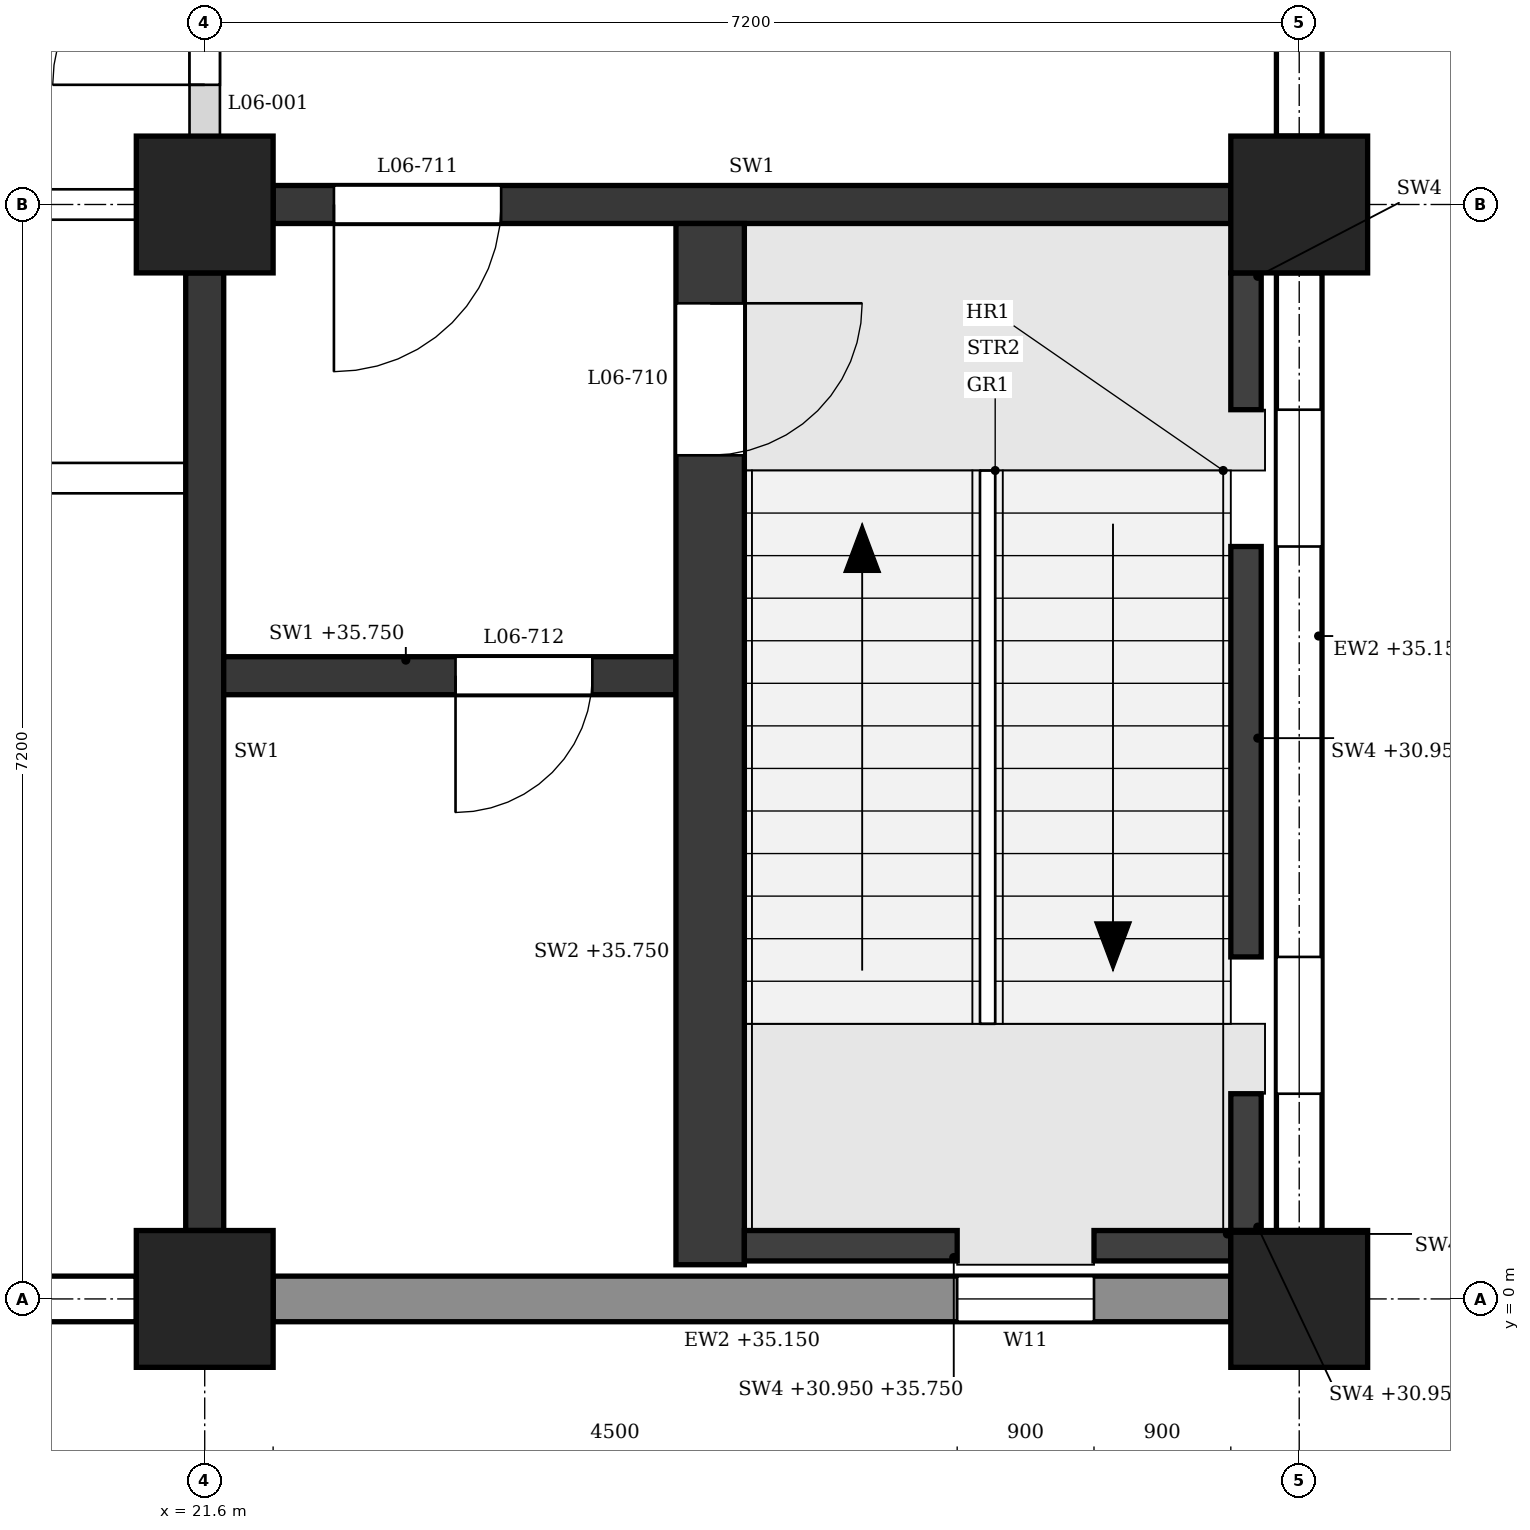
"""IFC4 building model, lengths in metres.
Left out: names, types, materials, properties, quantities, classifications, styles, units other than length and angle.
Written with IfcOpenShell. Run it as: python <this file> out.ifc"""

import sys

from ifc_helpers import new_model, si_unit, direction, frame, frame_2d, origin, origin_2d, place, context, subcontext, project, spatial, polyline, rectangle, outline, extrude, element, fill, save


model = new_model("IFC4")
c1 = context("Model", 3, precision=1e-05, world=origin(), true_north=direction((0.0, 1.0)))
c2 = subcontext(c1, "Body", "Model", "MODEL_VIEW")
j1 = project(units=[si_unit("LENGTHUNIT", "METRE"), si_unit("PLANEANGLEUNIT", "RADIAN")], contexts=[c1])
p1 = place(None, origin())
s1 = spatial("IfcSite", under=j1, at=p1, CompositionType="ELEMENT")
p2 = place(p1, origin())
s2 = spatial("IfcBuilding", under=s1, at=p2, CompositionType="ELEMENT")
p3 = place(p2, frame((0.0, 0.0, 31.2)))
s3 = spatial("IfcBuildingStorey", under=s2, at=p3, CompositionType="ELEMENT", Elevation=31.2)
for number, where, z_axis, x_axis in (
    (1, (21.6, 0.0, 0.0), (0.0, 0.0, 1.0), (1.0, 0.0, 0.0)),
    (2, (21.6, 7.2, 0.0), (0.0, 0.0, 1.0), (1.0, 0.0, 0.0)),
    (3, (28.8, 0.0, 0.0), (0.0, 0.0, 1.0), (1.0, 0.0, 0.0)),
    (4, (28.8, 7.2, 0.0), (0.0, 0.0, 1.0), (1.0, 0.0, 0.0)),
):
    element("IfcColumn", number, at=place(p3, frame(where, z_axis=z_axis, x_axis=x_axis)), inside=s3, PredefinedType="COLUMN", context=c2, shape_type="SweptSolid", body=[
        extrude(rectangle(XDim=0.9, YDim=0.9, at=origin_2d()), origin(), (0.0, 0.0, 1.0), 4.8),
    ])
p4 = place(p3, frame((14.85, 0.0, 0.0), z_axis=(0.0, 0.0, 1.0), x_axis=(1.0, 0.0, 0.0)))
e5 = element("IfcWall", 5, at=p4, inside=s3, PredefinedType="STANDARD", context=c2, shape_type="SweptSolid", body=[
    extrude(rectangle(XDim=6.3, YDim=0.3, at=frame_2d((3.15, 0.0))), origin(), (0.0, 0.0, 1.0), 3.95),
])
p5 = place(p4, frame((0.6, 0.0, 0.9)))
e6 = element("IfcOpeningElement", 6, at=p5, cuts=e5, PredefinedType="OPENING", context=c2, shape_type="SweptSolid", body=[
    extrude(outline(polyline([(0.0, 0.0), (1.5, 0.0), (1.5, 1.75), (0.75, 2.5), (0.0, 1.75), (0.0, 0.0)])), frame((0.0, 0.16, 0.0), z_axis=(0.0, -1.0, 0.0), x_axis=(1.0, 0.0, 0.0)), (0.0, 0.0, 1.0), 0.32),
])
p6 = place(p4, frame((4.2, 0.0, 0.9)))
e7 = element("IfcOpeningElement", 7, at=p6, cuts=e5, PredefinedType="OPENING", context=c2, shape_type="SweptSolid", body=[
    extrude(outline(polyline([(0.0, 0.0), (1.5, 0.0), (1.5, 1.75), (0.75, 2.5), (0.0, 1.75), (0.0, 0.0)])), frame((0.0, 0.16, 0.0), z_axis=(0.0, -1.0, 0.0), x_axis=(1.0, 0.0, 0.0)), (0.0, 0.0, 1.0), 0.32),
])
p7 = place(p3, frame((22.05, 0.0, 0.0), z_axis=(0.0, 0.0, 1.0), x_axis=(1.0, 0.0, 0.0)))
e8 = element("IfcWall", 8, at=p7, inside=s3, PredefinedType="STANDARD", context=c2, shape_type="SweptSolid", body=[
    extrude(rectangle(XDim=6.3, YDim=0.3, at=frame_2d((3.15, 0.0))), origin(), (0.0, 0.0, 1.0), 3.95),
])
p8 = place(p7, frame((4.5, 0.0, 0.9)))
e9 = element("IfcOpeningElement", 9, at=p8, cuts=e8, PredefinedType="OPENING", context=c2, shape_type="SweptSolid", body=[
    extrude(outline(polyline([(0.0, 0.0), (0.9, 0.0), (0.9, 2.05), (0.45, 2.5), (0.0, 2.05), (0.0, 0.0)])), frame((0.0, 0.16, 0.0), z_axis=(0.0, -1.0, 0.0), x_axis=(1.0, 0.0, 0.0)), (0.0, 0.0, 1.0), 0.32),
])
p9 = place(p3, frame((28.8, 0.45, 0.0), z_axis=(0.0, 0.0, 1.0), x_axis=(0.0, 1.0, 0.0)))
e10 = element("IfcWall", 10, at=p9, inside=s3, PredefinedType="STANDARD", context=c2, shape_type="SweptSolid", body=[
    extrude(rectangle(XDim=6.3, YDim=0.3, at=frame_2d((3.15, 0.0))), origin(), (0.0, 0.0, 1.0), 3.95),
])
p10 = place(p9, frame((0.9, 0.0, 0.9)))
e11 = element("IfcOpeningElement", 11, at=p10, cuts=e10, PredefinedType="OPENING", context=c2, shape_type="SweptSolid", body=[
    extrude(outline(polyline([(0.0, 0.0), (0.9, 0.0), (0.9, 2.05), (0.45, 2.5), (0.0, 2.05), (0.0, 0.0)])), frame((0.0, 0.16, 0.0), z_axis=(0.0, -1.0, 0.0), x_axis=(1.0, 0.0, 0.0)), (0.0, 0.0, 1.0), 0.32),
])
p11 = place(p9, frame((4.5, 0.0, 0.9)))
e12 = element("IfcOpeningElement", 12, at=p11, cuts=e10, PredefinedType="OPENING", context=c2, shape_type="SweptSolid", body=[
    extrude(outline(polyline([(0.0, 0.0), (0.9, 0.0), (0.9, 2.05), (0.45, 2.5), (0.0, 2.05), (0.0, 0.0)])), frame((0.0, 0.16, 0.0), z_axis=(0.0, -1.0, 0.0), x_axis=(1.0, 0.0, 0.0)), (0.0, 0.0, 1.0), 0.32),
])
p12 = place(p3, frame((28.8, 7.65, 0.0), z_axis=(0.0, 0.0, 1.0), x_axis=(0.0, 1.0, 0.0)))
e13 = element("IfcWall", 13, at=p12, inside=s3, PredefinedType="STANDARD", context=c2, shape_type="SweptSolid", body=[
    extrude(rectangle(XDim=6.3, YDim=0.3, at=frame_2d((3.15, 0.0))), origin(), (0.0, 0.0, 1.0), 3.95),
])
p13 = place(p12, frame((0.6, 0.0, 0.9)))
e14 = element("IfcOpeningElement", 14, at=p13, cuts=e13, PredefinedType="OPENING", context=c2, shape_type="SweptSolid", body=[
    extrude(outline(polyline([(0.0, 0.0), (1.5, 0.0), (1.5, 1.75), (0.75, 2.5), (0.0, 1.75), (0.0, 0.0)])), frame((0.0, 0.16, 0.0), z_axis=(0.0, -1.0, 0.0), x_axis=(1.0, 0.0, 0.0)), (0.0, 0.0, 1.0), 0.32),
])
p14 = place(p3, frame((22.05, 7.2, 0.0), z_axis=(0.0, 0.0, 1.0), x_axis=(1.0, 0.0, 0.0)))
e15 = element("IfcWall", 15, at=p14, inside=s3, PredefinedType="SHEAR", context=c2, shape_type="SweptSolid", body=[
    extrude(rectangle(XDim=6.3, YDim=0.25, at=frame_2d((3.15, 0.0))), origin(), (0.0, 0.0, 1.0), 3.8),
])
p15 = place(p14, frame((0.4, 0.0, 0.0)))
e16 = element("IfcOpeningElement", 16, at=p15, cuts=e15, PredefinedType="OPENING", context=c2, shape_type="SweptSolid", body=[
    extrude(rectangle(XDim=1.1, YDim=2.1, at=frame_2d((0.55, 1.05))), frame((0.0, 0.135, 0.0), z_axis=(0.0, -1.0, 0.0), x_axis=(1.0, 0.0, 0.0)), (0.0, 0.0, 1.0), 0.27),
])
p16 = place(p3, frame((21.6, 0.45, 0.0), z_axis=(0.0, 0.0, 1.0), x_axis=(0.0, 1.0, 0.0)))
e17 = element("IfcWall", 17, at=p16, inside=s3, PredefinedType="SHEAR", context=c2, shape_type="SweptSolid", body=[
    extrude(rectangle(XDim=6.3, YDim=0.25, at=frame_2d((3.15, 0.0))), origin(), (0.0, 0.0, 1.0), 3.8),
])
p17 = place(p3, frame((28.45, 0.45, -0.25), z_axis=(0.0, 0.0, 1.0), x_axis=(0.0, 1.0, 0.0)))
e18 = element("IfcWall", 18, at=p17, inside=s3, PredefinedType="SHEAR", context=c2, shape_type="SweptSolid", body=[
    extrude(rectangle(XDim=0.9, YDim=0.2, at=frame_2d((0.45, 0.0))), origin(), (0.0, 0.0, 1.0), 4.8),
])
p18 = place(p3, frame((28.45, 2.25, -0.25), z_axis=(0.0, 0.0, 1.0), x_axis=(0.0, 1.0, 0.0)))
e19 = element("IfcWall", 19, at=p18, inside=s3, PredefinedType="SHEAR", context=c2, shape_type="SweptSolid", body=[
    extrude(rectangle(XDim=2.7, YDim=0.2, at=frame_2d((1.35, 0.0))), origin(), (0.0, 0.0, 1.0), 4.8),
])
p19 = place(p3, frame((28.45, 5.85, -0.25), z_axis=(0.0, 0.0, 1.0), x_axis=(0.0, 1.0, 0.0)))
e20 = element("IfcWall", 20, at=p19, inside=s3, PredefinedType="SHEAR", context=c2, shape_type="SweptSolid", body=[
    extrude(rectangle(XDim=0.9, YDim=0.2, at=frame_2d((0.45, 0.0))), origin(), (0.0, 0.0, 1.0), 4.8),
])
p20 = place(p3, frame((25.15, 0.35, -0.25), z_axis=(0.0, 0.0, 1.0), x_axis=(1.0, 0.0, 0.0)))
e21 = element("IfcWall", 21, at=p20, inside=s3, PredefinedType="SHEAR", context=c2, shape_type="SweptSolid", body=[
    extrude(rectangle(XDim=1.4, YDim=0.2, at=frame_2d((0.7, 0.0))), origin(), (0.0, 0.0, 1.0), 4.8),
])
p21 = place(p3, frame((27.45, 0.35, -0.25), z_axis=(0.0, 0.0, 1.0), x_axis=(1.0, 0.0, 0.0)))
e22 = element("IfcWall", 22, at=p21, inside=s3, PredefinedType="SHEAR", context=c2, shape_type="SweptSolid", body=[
    extrude(rectangle(XDim=0.9, YDim=0.2, at=frame_2d((0.45, 0.0))), origin(), (0.0, 0.0, 1.0), 4.8),
])
p22 = place(p3, frame((24.925, 0.225, 0.0), z_axis=(0.0, 0.0, 1.0), x_axis=(0.0, 1.0, 0.0)))
e23 = element("IfcWall", 23, at=p22, inside=s3, PredefinedType="SHEAR", context=c2, shape_type="SweptSolid", body=[
    extrude(rectangle(XDim=6.85, YDim=0.45, at=frame_2d((3.425, 0.0))), origin(), (0.0, 0.0, 1.0), 4.55),
])
p23 = place(p22, frame((5.325, 0.0, 0.0)))
e24 = element("IfcOpeningElement", 24, at=p23, cuts=e23, PredefinedType="OPENING", context=c2, shape_type="SweptSolid", body=[
    extrude(rectangle(XDim=1.0, YDim=2.1, at=frame_2d((0.5, 1.05))), frame((0.0, 0.235, 0.0), z_axis=(0.0, -1.0, 0.0), x_axis=(1.0, 0.0, 0.0)), (0.0, 0.0, 1.0), 0.47),
])
p24 = place(p3, frame((21.725, 4.1, 0.0), z_axis=(0.0, 0.0, 1.0), x_axis=(1.0, 0.0, 0.0)))
e25 = element("IfcWall", 25, at=p24, inside=s3, PredefinedType="SHEAR", context=c2, shape_type="SweptSolid", body=[
    extrude(rectangle(XDim=2.975, YDim=0.25, at=frame_2d((1.487, 0.0))), origin(), (0.0, 0.0, 1.0), 4.55),
])
p25 = place(p24, frame((1.525, 0.0, 0.0)))
e26 = element("IfcOpeningElement", 26, at=p25, cuts=e25, PredefinedType="OPENING", context=c2, shape_type="SweptSolid", body=[
    extrude(rectangle(XDim=0.9, YDim=2.1, at=frame_2d((0.45, 1.05))), frame((0.0, 0.135, 0.0), z_axis=(0.0, -1.0, 0.0), x_axis=(1.0, 0.0, 0.0)), (0.0, 0.0, 1.0), 0.27),
])
p26 = place(p3, frame((7.325, 5.4, 0.0), z_axis=(0.0, 0.0, 1.0), x_axis=(1.0, 0.0, 0.0)))
e27 = element("IfcWall", 27, at=p26, inside=s3, PredefinedType="PARTITIONING", context=c2, shape_type="SweptSolid", body=[
    extrude(outline(polyline([(0.0, 0.0), (14.15, 0.0), (14.15, 3.8), (14.025, 3.8), (14.025, 4.55), (7.325, 4.55), (7.325, 3.8), (6.825, 3.8), (6.825, 4.55), (0.125, 4.55), (0.125, 3.8), (0.0, 3.8), (0.0, 0.0)])), frame((0.0, 0.1, 0.0), z_axis=(0.0, -1.0, 0.0), x_axis=(1.0, 0.0, 0.0)), (0.0, 0.0, 1.0), 0.2),
])
p27 = place(p26, frame((1.238, 0.0, 0.0)))
e28 = element("IfcOpeningElement", 28, at=p27, cuts=e27, PredefinedType="OPENING", context=c2, shape_type="SweptSolid", body=[
    extrude(rectangle(XDim=1.0, YDim=2.1, at=frame_2d((0.5, 1.05))), frame((0.0, 0.11, 0.0), z_axis=(0.0, -1.0, 0.0), x_axis=(1.0, 0.0, 0.0)), (0.0, 0.0, 1.0), 0.22),
])
p28 = place(p26, frame((4.775, 0.0, 0.0)))
e29 = element("IfcOpeningElement", 29, at=p28, cuts=e27, PredefinedType="OPENING", context=c2, shape_type="SweptSolid", body=[
    extrude(rectangle(XDim=1.0, YDim=2.1, at=frame_2d((0.5, 1.05))), frame((0.0, 0.11, 0.0), z_axis=(0.0, -1.0, 0.0), x_axis=(1.0, 0.0, 0.0)), (0.0, 0.0, 1.0), 0.22),
])
p29 = place(p26, frame((8.375, 0.0, 0.0)))
e30 = element("IfcOpeningElement", 30, at=p29, cuts=e27, PredefinedType="OPENING", context=c2, shape_type="SweptSolid", body=[
    extrude(rectangle(XDim=1.0, YDim=2.1, at=frame_2d((0.5, 1.05))), frame((0.0, 0.11, 0.0), z_axis=(0.0, -1.0, 0.0), x_axis=(1.0, 0.0, 0.0)), (0.0, 0.0, 1.0), 0.22),
])
p30 = place(p26, frame((11.913, 0.0, 0.0)))
e31 = element("IfcOpeningElement", 31, at=p30, cuts=e27, PredefinedType="OPENING", context=c2, shape_type="SweptSolid", body=[
    extrude(rectangle(XDim=1.0, YDim=2.1, at=frame_2d((0.5, 1.05))), frame((0.0, 0.11, 0.0), z_axis=(0.0, -1.0, 0.0), x_axis=(1.0, 0.0, 0.0)), (0.0, 0.0, 1.0), 0.22),
])
p31 = place(p3, frame((14.85, 7.2, 0.0), z_axis=(0.0, 0.0, 1.0), x_axis=(1.0, 0.0, 0.0)))
e32 = element("IfcWall", 32, at=p31, inside=s3, PredefinedType="PARTITIONING", context=c2, shape_type="SweptSolid", body=[
    extrude(rectangle(XDim=6.3, YDim=0.2, at=frame_2d((3.15, 0.0))), origin(), (0.0, 0.0, 1.0), 3.8),
])
p32 = place(p31, frame((4.225, 0.0, 0.0)))
e33 = element("IfcOpeningElement", 33, at=p32, cuts=e32, PredefinedType="OPENING", context=c2, shape_type="SweptSolid", body=[
    extrude(rectangle(XDim=1.0, YDim=2.1, at=frame_2d((0.5, 1.05))), frame((0.0, 0.11, 0.0), z_axis=(0.0, -1.0, 0.0), x_axis=(1.0, 0.0, 0.0)), (0.0, 0.0, 1.0), 0.22),
])
p33 = place(p3, frame((21.6, 7.65, 0.0), z_axis=(0.0, 0.0, 1.0), x_axis=(0.0, 1.0, 0.0)))
e34 = element("IfcWall", 34, at=p33, inside=s3, PredefinedType="PARTITIONING", context=c2, shape_type="SweptSolid", body=[
    extrude(rectangle(XDim=2.675, YDim=0.2, at=frame_2d((1.337, 0.0))), origin(), (0.0, 0.0, 1.0), 3.8),
])
p34 = place(p33, frame((0.337, 0.0, 0.0)))
e35 = element("IfcOpeningElement", 35, at=p34, cuts=e34, PredefinedType="OPENING", context=c2, shape_type="SweptSolid", body=[
    extrude(rectangle(XDim=2.0, YDim=2.4, at=frame_2d((1.0, 1.2))), frame((0.0, 0.11, 0.0), z_axis=(0.0, -1.0, 0.0), x_axis=(1.0, 0.0, 0.0)), (0.0, 0.0, 1.0), 0.22),
])
p35 = place(p10, origin())
e36 = element("IfcWindow", 36, at=p35, inside=s3, PartitioningType="SINGLE_PANEL", PredefinedType="WINDOW", context=c2, shape_type="SweptSolid", body=[
    extrude(outline(polyline([(0.0, 0.0), (0.9, 0.0), (0.9, 2.05), (0.45, 2.5), (0.0, 2.05), (0.0, 0.0)])), frame((0.0, 0.03, 0.0), z_axis=(0.0, -1.0, 0.0), x_axis=(1.0, 0.0, 0.0)), (0.0, 0.0, 1.0), 0.06),
])
fill(e11, e36)
p36 = place(p11, origin())
e37 = element("IfcWindow", 37, at=p36, inside=s3, PartitioningType="SINGLE_PANEL", PredefinedType="WINDOW", context=c2, shape_type="SweptSolid", body=[
    extrude(outline(polyline([(0.0, 0.0), (0.9, 0.0), (0.9, 2.05), (0.45, 2.5), (0.0, 2.05), (0.0, 0.0)])), frame((0.0, 0.03, 0.0), z_axis=(0.0, -1.0, 0.0), x_axis=(1.0, 0.0, 0.0)), (0.0, 0.0, 1.0), 0.06),
])
fill(e12, e37)
p37 = place(p8, origin())
e38 = element("IfcWindow", 38, at=p37, inside=s3, PartitioningType="SINGLE_PANEL", PredefinedType="WINDOW", context=c2, shape_type="SweptSolid", body=[
    extrude(outline(polyline([(0.0, 0.0), (0.9, 0.0), (0.9, 2.05), (0.45, 2.5), (0.0, 2.05), (0.0, 0.0)])), frame((0.0, 0.03, 0.0), z_axis=(0.0, -1.0, 0.0), x_axis=(1.0, 0.0, 0.0)), (0.0, 0.0, 1.0), 0.06),
])
fill(e9, e38)
p38 = place(p23, frame((1.0, 0.0, 0.0), z_axis=(0.0, 0.0, 1.0), x_axis=(-1.0, 0.0, 0.0)))
e39 = element("IfcDoor", 39, at=p38, inside=s3, OperationType="SINGLE_SWING_LEFT", PredefinedType="DOOR", context=c2, shape_type="SweptSolid", body=[
    extrude(rectangle(XDim=1.0, YDim=2.1, at=frame_2d((0.5, 1.05))), frame((0.0, 0.025, 0.0), z_axis=(0.0, -1.0, 0.0), x_axis=(1.0, 0.0, 0.0)), (0.0, 0.0, 1.0), 0.05),
])
fill(e24, e39)
p39 = place(p15, frame((1.1, 0.0, 0.0), z_axis=(0.0, 0.0, 1.0), x_axis=(-1.0, 0.0, 0.0)))
e40 = element("IfcDoor", 40, at=p39, inside=s3, OperationType="SINGLE_SWING_RIGHT", PredefinedType="DOOR", context=c2, shape_type="SweptSolid", body=[
    extrude(rectangle(XDim=1.1, YDim=2.1, at=frame_2d((0.55, 1.05))), frame((0.0, 0.025, 0.0), z_axis=(0.0, -1.0, 0.0), x_axis=(1.0, 0.0, 0.0)), (0.0, 0.0, 1.0), 0.05),
])
fill(e16, e40)
p40 = place(p25, frame((0.9, 0.0, 0.0), z_axis=(0.0, 0.0, 1.0), x_axis=(-1.0, 0.0, 0.0)))
e41 = element("IfcDoor", 41, at=p40, inside=s3, OperationType="SINGLE_SWING_RIGHT", PredefinedType="DOOR", context=c2, shape_type="SweptSolid", body=[
    extrude(rectangle(XDim=0.9, YDim=2.1, at=frame_2d((0.45, 1.05))), frame((0.0, 0.025, 0.0), z_axis=(0.0, -1.0, 0.0), x_axis=(1.0, 0.0, 0.0)), (0.0, 0.0, 1.0), 0.05),
])
fill(e26, e41)
p41 = place(p34, origin())
e42 = element("IfcDoor", 42, at=p41, inside=s3, OperationType="DOUBLE_DOOR_SINGLE_SWING", PredefinedType="DOOR", context=c2, shape_type="SweptSolid", body=[
    extrude(rectangle(XDim=2.0, YDim=2.4, at=frame_2d((1.0, 1.2))), frame((0.0, 0.025, 0.0), z_axis=(0.0, -1.0, 0.0), x_axis=(1.0, 0.0, 0.0)), (0.0, 0.0, 1.0), 0.05),
])
fill(e35, e42)
save(model, sys.argv[1])
